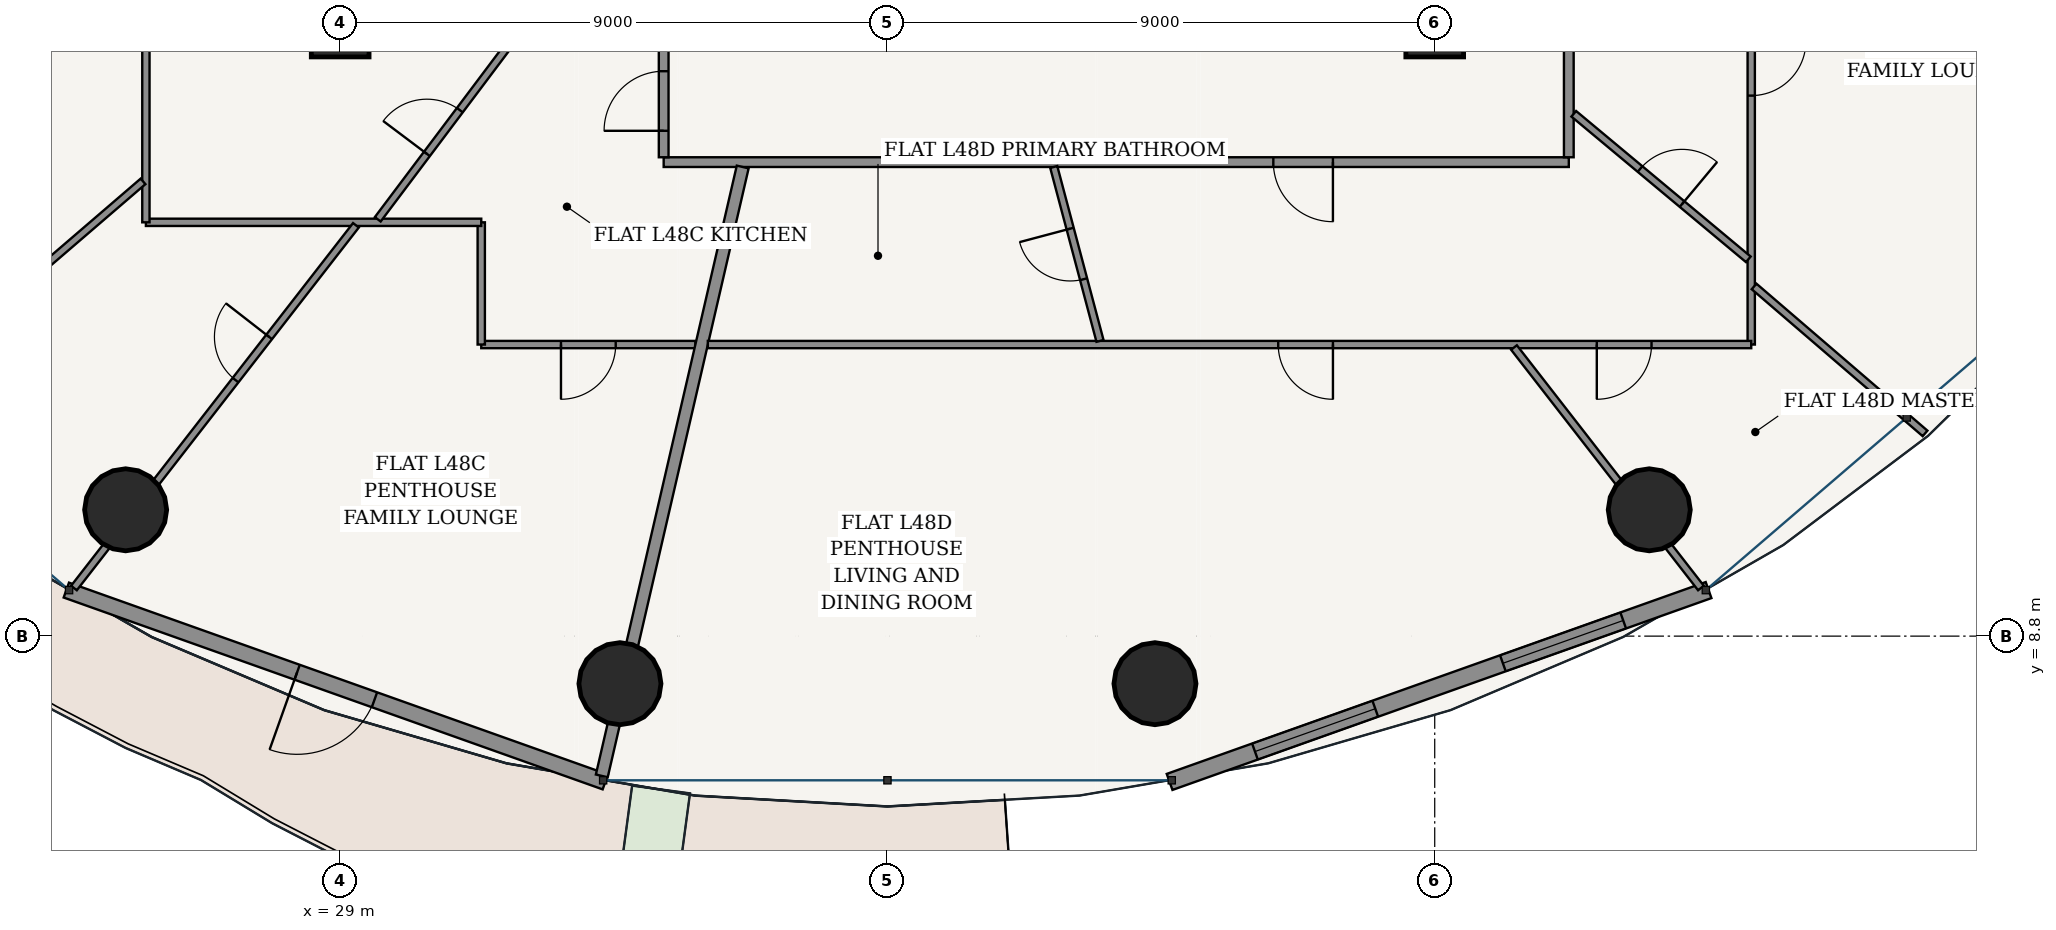
"""IFC4 building model, lengths in metres.
Left out: names, types, materials, properties, quantities, classifications, styles, units other than length and angle.
Written with IfcOpenShell. Run it as: python <this file> out.ifc"""

import sys

from ifc_helpers import new_model, si_unit, direction, frame, frame_2d, origin, origin_2d, place, context, subcontext, project, spatial, rectangle, hollow_circle, extrude, source, transform, mapped, element, fill, save


model = new_model("IFC4")
c1 = context("Model", 3, precision=1e-05, world=origin(), true_north=direction((-0.2419218956, 0.970295726276)))
c2 = subcontext(c1, "Body", "Model", "MODEL_VIEW")
j1 = project(units=[si_unit("LENGTHUNIT", "METRE"), si_unit("PLANEANGLEUNIT", "RADIAN")], contexts=[c1])
p1 = place(None, origin())
s1 = spatial("IfcSite", under=j1, at=p1, CompositionType="ELEMENT")
p2 = place(p1, origin())
s2 = spatial("IfcBuilding", under=s1, at=p2, CompositionType="ELEMENT")
p3 = place(p2, frame((0.0, 0.0, 182.2)))
s3 = spatial("IfcBuildingStorey", under=s2, at=p3, CompositionType="ELEMENT", Elevation=182.2)
for number, where, z_axis, x_axis in (
    (1, (29.0, 18.8, 0.0), (0.0, 0.0, 1.0), (1.0, 0.0, 0.0)),
    (2, (47.0, 18.8, 0.0), (0.0, 0.0, 1.0), (1.0, 0.0, 0.0)),
):
    element("IfcColumn", number, at=place(p3, frame(where, z_axis=z_axis, x_axis=x_axis)), inside=s3, PredefinedType="COLUMN", context=c2, shape_type="SweptSolid", body=[
        extrude(rectangle(XDim=0.95, YDim=0.95, at=origin_2d()), origin(), (0.0, 0.0, 1.0), 3.6),
    ])
for number, where, z_axis, x_axis in (
    (3, (25.472, 10.877, 0.0), (0.0, 0.0, 1.0), (1.0, 0.0, 0.0)),
    (4, (33.601, 8.018, 0.0), (0.0, 0.0, 1.0), (1.0, 0.0, 0.0)),
    (5, (42.399, 8.018, 0.0), (0.0, 0.0, 1.0), (1.0, 0.0, 0.0)),
    (6, (50.528, 10.877, 0.0), (0.0, 0.0, 1.0), (1.0, 0.0, 0.0)),
):
    element("IfcColumn", number, at=place(p3, frame(where, z_axis=z_axis, x_axis=x_axis)), inside=s3, PredefinedType="COLUMN", context=c2, shape_type="SweptSolid", body=[
        extrude(hollow_circle(Radius=0.675, WallThickness=0.042, at=origin_2d()), origin(), (0.0, 0.0, 1.0), 3.6),
    ])
p4 = place(p3, frame((24.497, 9.557, 0.0), z_axis=(0.0, 0.0, 1.0), x_axis=(0.942103604331, -0.335321932934, 0.0)))
e7 = element("IfcWall", 7, at=p4, inside=s3, PredefinedType="SOLIDWALL", context=c2, shape_type="SweptSolid", body=[
    extrude(rectangle(XDim=9.408, YDim=0.26, at=frame_2d((4.704, 0.0))), origin(), (0.0, 0.0, 1.0), 3.15),
])
p5 = place(p4, frame((4.029, 0.0, 0.0)))
e8 = element("IfcOpeningElement", 8, at=p5, cuts=e7, PredefinedType="OPENING", context=c2, shape_type="SweptSolid", body=[
    extrude(rectangle(XDim=1.35, YDim=2.2, at=frame_2d((0.675, 1.1))), frame((0.0, 0.14, 0.0), z_axis=(0.0, -1.0, 0.0), x_axis=(1.0, 0.0, 0.0)), (0.0, 0.0, 1.0), 0.28),
])
p6 = place(p3, frame((42.64, 6.402, 0.0), z_axis=(0.0, 0.0, 1.0), x_axis=(0.942103604331, 0.335321932934, 0.0)))
e9 = element("IfcWall", 9, at=p6, inside=s3, PredefinedType="SOLIDWALL", context=c2, shape_type="SweptSolid", body=[
    extrude(rectangle(XDim=9.408, YDim=0.28, at=frame_2d((4.704, 0.0))), origin(), (0.0, 0.0, 1.0), 3.15),
])
p7 = place(p6, frame((1.49, 0.0, 0.85)))
e10 = element("IfcOpeningElement", 10, at=p7, cuts=e9, PredefinedType="OPENING", context=c2, shape_type="SweptSolid", body=[
    extrude(rectangle(XDim=2.1, YDim=1.95, at=frame_2d((1.05, 0.975))), frame((0.0, 0.15, 0.0), z_axis=(0.0, -1.0, 0.0), x_axis=(1.0, 0.0, 0.0)), (0.0, 0.0, 1.0), 0.3),
])
p8 = place(p6, frame((5.818, 0.0, 0.85)))
e11 = element("IfcOpeningElement", 11, at=p8, cuts=e9, PredefinedType="OPENING", context=c2, shape_type="SweptSolid", body=[
    extrude(rectangle(XDim=2.1, YDim=1.95, at=frame_2d((1.05, 0.975))), frame((0.0, 0.15, 0.0), z_axis=(0.0, -1.0, 0.0), x_axis=(1.0, 0.0, 0.0)), (0.0, 0.0, 1.0), 0.3),
])
p9 = place(p3, frame((34.32, 16.595, 0.0), z_axis=(0.0, 0.0, 1.0), x_axis=(1.0, 0.0, 0.0)))
e12 = element("IfcWall", 12, at=p9, inside=s3, PredefinedType="PARTITIONING", context=c2, shape_type="SweptSolid", body=[
    extrude(rectangle(XDim=14.885, YDim=0.16, at=frame_2d((7.442, 0.0))), origin(), (0.0, 0.0, 1.0), 2.666),
])
p10 = place(p9, frame((10.026, 0.0, 0.0)))
e13 = element("IfcOpeningElement", 13, at=p10, cuts=e12, PredefinedType="OPENING", context=c2, shape_type="SweptSolid", body=[
    extrude(rectangle(XDim=0.98, YDim=2.2, at=frame_2d((0.49, 1.1))), frame((0.0, 0.09, 0.0), z_axis=(0.0, -1.0, 0.0), x_axis=(1.0, 0.0, 0.0)), (0.0, 0.0, 1.0), 0.18),
])
p11 = place(p3, frame((34.32, 16.675, 0.0), z_axis=(0.0, 0.0, 1.0), x_axis=(0.0, 1.0, 0.0)))
e14 = element("IfcWall", 14, at=p11, inside=s3, PredefinedType="PARTITIONING", context=c2, shape_type="SweptSolid", body=[
    extrude(rectangle(XDim=1.85, YDim=0.16, at=frame_2d((0.925, 0.0))), origin(), (0.0, 0.0, 1.0), 3.15),
])
p12 = place(p11, frame((0.435, 0.0, 0.0)))
e15 = element("IfcOpeningElement", 15, at=p12, cuts=e14, PredefinedType="OPENING", context=c2, shape_type="SweptSolid", body=[
    extrude(rectangle(XDim=0.98, YDim=2.2, at=frame_2d((0.49, 1.1))), frame((0.0, 0.09, 0.0), z_axis=(0.0, -1.0, 0.0), x_axis=(1.0, 0.0, 0.0)), (0.0, 0.0, 1.0), 0.18),
])
p13 = place(p3, frame((49.205, 16.675, 0.0), z_axis=(0.0, 0.0, 1.0), x_axis=(0.0, 1.0, 0.0)))
e16 = element("IfcWall", 16, at=p13, inside=s3, PredefinedType="PARTITIONING", context=c2, shape_type="SweptSolid", body=[
    extrude(rectangle(XDim=18.4, YDim=0.16, at=frame_2d((9.2, 0.0))), origin(), (0.0, 0.0, 1.0), 2.666),
])
p14 = place(p3, frame((34.842, 13.595, 0.0), z_axis=(0.0, 0.0, 1.0), x_axis=(-1.0, 0.0, 0.0)))
e17 = element("IfcWall", 17, at=p14, inside=s3, PredefinedType="PARTITIONING", context=c2, shape_type="SweptSolid", body=[
    extrude(rectangle(XDim=3.522, YDim=0.12, at=frame_2d((1.761, 0.0))), origin(), (0.0, 0.0, 1.0), 3.15),
])
p15 = place(p14, frame((1.311, 0.0, 0.0)))
e18 = element("IfcOpeningElement", 18, at=p15, cuts=e17, PredefinedType="OPENING", context=c2, shape_type="SweptSolid", body=[
    extrude(rectangle(XDim=0.9, YDim=2.15, at=frame_2d((0.45, 1.075))), frame((0.0, 0.07, 0.0), z_axis=(0.0, -1.0, 0.0), x_axis=(1.0, 0.0, 0.0)), (0.0, 0.0, 1.0), 0.14),
])
p16 = place(p3, frame((31.32, 13.595, 0.0), z_axis=(0.0, 0.0, 1.0), x_axis=(0.0, 1.0, 0.0)))
e19 = element("IfcWall", 19, at=p16, inside=s3, PredefinedType="PARTITIONING", context=c2, shape_type="SweptSolid", body=[
    extrude(rectangle(XDim=2.01, YDim=0.12, at=frame_2d((1.005, 0.0))), origin(), (0.0, 0.0, 1.0), 2.825),
])
p17 = place(p3, frame((31.32, 15.605, 0.0), z_axis=(0.0, 0.0, 1.0), x_axis=(-1.0, 0.0, 0.0)))
e20 = element("IfcWall", 20, at=p17, inside=s3, PredefinedType="PARTITIONING", context=c2, shape_type="SweptSolid", body=[
    extrude(rectangle(XDim=5.515, YDim=0.12, at=frame_2d((2.758, 0.0))), origin(), (0.0, 0.0, 1.0), 2.666),
])
p18 = place(p3, frame((25.805, 15.605, 0.0), z_axis=(0.0, 0.0, 1.0), x_axis=(0.0, 1.0, 0.0)))
e21 = element("IfcWall", 21, at=p18, inside=s3, PredefinedType="PARTITIONING", context=c2, shape_type="SweptSolid", body=[
    extrude(rectangle(XDim=5.715, YDim=0.12, at=frame_2d((2.857, 0.0))), origin(), (0.0, 0.0, 1.0), 2.666),
])
p19 = place(p3, frame((25.758, 16.278, 0.0), z_axis=(0.0, 0.0, 1.0), x_axis=(-0.758374994665, -0.651818508073, 0.0)))
e22 = element("IfcWall", 22, at=p19, inside=s3, PredefinedType="PARTITIONING", context=c2, shape_type="SweptSolid", body=[
    extrude(rectangle(XDim=6.358, YDim=0.12, at=frame_2d((3.179, 0.0))), origin(), (0.0, 0.0, 1.0), 2.666),
])
p20 = place(p19, frame((2.729, 0.0, 0.0)))
e23 = element("IfcOpeningElement", 23, at=p20, cuts=e22, PredefinedType="OPENING", context=c2, shape_type="SweptSolid", body=[
    extrude(rectangle(XDim=0.9, YDim=2.15, at=frame_2d((0.45, 1.075))), frame((0.0, 0.07, 0.0), z_axis=(0.0, -1.0, 0.0), x_axis=(1.0, 0.0, 0.0)), (0.0, 0.0, 1.0), 0.14),
])
p21 = place(p3, frame((29.259, 15.556, 0.0), z_axis=(0.0, 0.0, 1.0), x_axis=(-0.61375493029, -0.789496602617, 0.0)))
e24 = element("IfcWall", 24, at=p21, inside=s3, PredefinedType="PARTITIONING", context=c2, shape_type="SweptSolid", body=[
    extrude(rectangle(XDim=7.556, YDim=0.12, at=frame_2d((3.778, 0.0))), origin(), (0.0, 0.0, 1.0), 2.5),
])
p22 = place(p21, frame((2.325, 0.0, 0.0)))
e25 = element("IfcOpeningElement", 25, at=p22, cuts=e24, PredefinedType="OPENING", context=c2, shape_type="SweptSolid", body=[
    extrude(rectangle(XDim=0.9, YDim=2.15, at=frame_2d((0.45, 1.075))), frame((0.0, 0.07, 0.0), z_axis=(0.0, -1.0, 0.0), x_axis=(1.0, 0.0, 0.0)), (0.0, 0.0, 1.0), 0.14),
])
p23 = place(p3, frame((31.777, 18.525, 0.0), z_axis=(0.0, 0.0, 1.0), x_axis=(-0.601054484551, -0.799208049635, 0.0)))
e26 = element("IfcWall", 26, at=p23, inside=s3, PredefinedType="PARTITIONING", context=c2, shape_type="SweptSolid", body=[
    extrude(rectangle(XDim=3.592, YDim=0.12, at=frame_2d((1.796, 0.0))), origin(), (0.0, 0.0, 1.0), 3.15),
])
p24 = place(p23, frame((1.346, 0.0, 0.0)))
e27 = element("IfcOpeningElement", 27, at=p24, cuts=e26, PredefinedType="OPENING", context=c2, shape_type="SweptSolid", body=[
    extrude(rectangle(XDim=0.9, YDim=2.15, at=frame_2d((0.45, 1.075))), frame((0.0, 0.07, 0.0), z_axis=(0.0, -1.0, 0.0), x_axis=(1.0, 0.0, 0.0)), (0.0, 0.0, 1.0), 0.14),
])
p25 = place(p3, frame((35.62, 16.515, 0.0), z_axis=(0.0, 0.0, 1.0), x_axis=(-0.225473598067, -0.974249278457, 0.0)))
e28 = element("IfcWall", 28, at=p25, inside=s3, PredefinedType="PARTITIONING", context=c2, shape_type="SweptSolid", body=[
    extrude(rectangle(XDim=10.278, YDim=0.2, at=frame_2d((5.139, 0.0))), origin(), (0.0, 0.0, 1.0), 2.5),
])
p26 = place(p3, frame((52.205, 21.641, 0.0), z_axis=(0.0, 0.0, 1.0), x_axis=(0.0, -1.0, 0.0)))
e29 = element("IfcWall", 29, at=p26, inside=s3, PredefinedType="PARTITIONING", context=c2, shape_type="SweptSolid", body=[
    extrude(rectangle(XDim=8.046, YDim=0.12, at=frame_2d((4.023, 0.0))), origin(), (0.0, 0.0, 1.0), 2.666),
])
p27 = place(p26, frame((3.052, 0.0, 0.0)))
e30 = element("IfcOpeningElement", 30, at=p27, cuts=e29, PredefinedType="OPENING", context=c2, shape_type="SweptSolid", body=[
    extrude(rectangle(XDim=0.9, YDim=2.15, at=frame_2d((0.45, 1.075))), frame((0.0, 0.07, 0.0), z_axis=(0.0, -1.0, 0.0), x_axis=(1.0, 0.0, 0.0)), (0.0, 0.0, 1.0), 0.14),
])
p28 = place(p3, frame((52.205, 13.595, 0.0), z_axis=(0.0, 0.0, 1.0), x_axis=(-1.0, 0.0, 0.0)))
e31 = element("IfcWall", 31, at=p28, inside=s3, PredefinedType="PARTITIONING", context=c2, shape_type="SweptSolid", body=[
    extrude(rectangle(XDim=17.159, YDim=0.12, at=frame_2d((8.58, 0.0))), origin(), (0.0, 0.0, 1.0), 2.666),
])
p29 = place(p28, frame((6.879, 0.0, 0.0)))
e32 = element("IfcOpeningElement", 32, at=p29, cuts=e31, PredefinedType="OPENING", context=c2, shape_type="SweptSolid", body=[
    extrude(rectangle(XDim=0.9, YDim=2.15, at=frame_2d((0.45, 1.075))), frame((0.0, 0.07, 0.0), z_axis=(0.0, -1.0, 0.0), x_axis=(1.0, 0.0, 0.0)), (0.0, 0.0, 1.0), 0.14),
])
p30 = place(p28, frame((1.64, 0.0, 0.0)))
e33 = element("IfcOpeningElement", 33, at=p30, cuts=e31, PredefinedType="OPENING", context=c2, shape_type="SweptSolid", body=[
    extrude(rectangle(XDim=0.9, YDim=2.15, at=frame_2d((0.45, 1.075))), frame((0.0, 0.07, 0.0), z_axis=(0.0, -1.0, 0.0), x_axis=(1.0, 0.0, 0.0)), (0.0, 0.0, 1.0), 0.14),
])
p31 = place(p3, frame((48.304, 13.546, 0.0), z_axis=(0.0, 0.0, 1.0), x_axis=(0.613734792328, -0.789512257464, 0.0)))
e34 = element("IfcWall", 34, at=p31, inside=s3, PredefinedType="PARTITIONING", context=c2, shape_type="SweptSolid", body=[
    extrude(rectangle(XDim=5.01, YDim=0.12, at=frame_2d((2.505, 0.0))), origin(), (0.0, 0.0, 1.0), 2.5),
])
p32 = place(p3, frame((52.252, 14.55, 0.0), z_axis=(0.0, 0.0, 1.0), x_axis=(0.758368113794, -0.651826513714, 0.0)))
e35 = element("IfcWall", 35, at=p32, inside=s3, PredefinedType="PARTITIONING", context=c2, shape_type="SweptSolid", body=[
    extrude(rectangle(XDim=3.708, YDim=0.12, at=frame_2d((1.854, 0.0))), origin(), (0.0, 0.0, 1.0), 2.666),
])
p33 = place(p3, frame((40.735, 16.515, 0.0), z_axis=(0.0, 0.0, 1.0), x_axis=(0.256989915822, -0.966414084731, 0.0)))
e36 = element("IfcWall", 36, at=p33, inside=s3, PredefinedType="PARTITIONING", context=c2, shape_type="SweptSolid", body=[
    extrude(rectangle(XDim=2.959, YDim=0.12, at=frame_2d((1.479, 0.0))), origin(), (0.0, 0.0, 1.0), 2.825),
])
p34 = place(p33, frame((1.05, 0.0, 0.0)))
e37 = element("IfcOpeningElement", 37, at=p34, cuts=e36, PredefinedType="OPENING", context=c2, shape_type="SweptSolid", body=[
    extrude(rectangle(XDim=0.86, YDim=2.15, at=frame_2d((0.43, 1.075))), frame((0.0, 0.07, 0.0), z_axis=(0.0, -1.0, 0.0), x_axis=(1.0, 0.0, 0.0)), (0.0, 0.0, 1.0), 0.14),
])
p35 = place(p3, frame((49.287, 17.39, 0.0), z_axis=(0.0, 0.0, 1.0), x_axis=(0.768065994597, -0.640370695725, 0.0)))
e38 = element("IfcWall", 38, at=p35, inside=s3, PredefinedType="PARTITIONING", context=c2, shape_type="SweptSolid", body=[
    extrude(rectangle(XDim=3.738, YDim=0.12, at=frame_2d((1.869, 0.0))), origin(), (0.0, 0.0, 1.0), 2.825),
])
p36 = place(p35, frame((1.419, 0.0, 0.0)))
e39 = element("IfcOpeningElement", 39, at=p36, cuts=e38, PredefinedType="OPENING", context=c2, shape_type="SweptSolid", body=[
    extrude(rectangle(XDim=0.9, YDim=2.15, at=frame_2d((0.45, 1.075))), frame((0.0, 0.07, 0.0), z_axis=(0.0, -1.0, 0.0), x_axis=(1.0, 0.0, 0.0)), (0.0, 0.0, 1.0), 0.14),
])
m1 = source(origin(), c2, "Body", "SweptSolid", [
    extrude(rectangle(XDim=1.35, YDim=2.2, at=frame_2d((0.675, 1.1))), frame((0.0, 0.025, 0.0), z_axis=(0.0, -1.0, 0.0), x_axis=(1.0, 0.0, 0.0)), (0.0, 0.0, 1.0), 0.05),
])
p37 = place(p5, frame((1.35, 0.0, 0.0), z_axis=(0.0, 0.0, 1.0), x_axis=(-1.0, 0.0, 0.0)))
e40 = element("IfcDoor", 40, at=p37, inside=s3, OperationType="SINGLE_SWING_RIGHT", PredefinedType="DOOR", context=c2, shape_type="MappedRepresentation", body=[
    mapped(m1, transform((0.0, 0.0, 0.0), scale=1.0)),
])
fill(e8, e40)
m2 = source(origin(), c2, "Body", "SweptSolid", [
    extrude(rectangle(XDim=2.1, YDim=1.95, at=frame_2d((1.05, 0.975))), frame((0.0, 0.03, 0.0), z_axis=(0.0, -1.0, 0.0), x_axis=(1.0, 0.0, 0.0)), (0.0, 0.0, 1.0), 0.06),
])
p38 = place(p7, origin())
e41 = element("IfcWindow", 41, at=p38, inside=s3, PartitioningType="SINGLE_PANEL", PredefinedType="WINDOW", context=c2, shape_type="MappedRepresentation", body=[
    mapped(m2, transform((0.0, 0.0, 0.0), scale=1.0)),
])
fill(e10, e41)
p39 = place(p8, origin())
e42 = element("IfcWindow", 42, at=p39, inside=s3, PartitioningType="SINGLE_PANEL", PredefinedType="WINDOW", context=c2, shape_type="MappedRepresentation", body=[
    mapped(m2, transform((0.0, 0.0, 0.0), scale=1.0)),
])
fill(e11, e42)
m3 = source(origin(), c2, "Body", "SweptSolid", [
    extrude(rectangle(XDim=0.98, YDim=2.2, at=frame_2d((0.49, 1.1))), frame((0.0, 0.025, 0.0), z_axis=(0.0, -1.0, 0.0), x_axis=(1.0, 0.0, 0.0)), (0.0, 0.0, 1.0), 0.05),
])
p40 = place(p12, origin())
e43 = element("IfcDoor", 43, at=p40, inside=s3, OperationType="SINGLE_SWING_LEFT", PredefinedType="DOOR", context=c2, shape_type="MappedRepresentation", body=[
    mapped(m3, transform((0.0, 0.0, 0.0), scale=1.0)),
])
fill(e15, e43)
m4 = source(origin(), c2, "Body", "SweptSolid", [
    extrude(rectangle(XDim=0.9, YDim=2.15, at=frame_2d((0.45, 1.075))), frame((0.0, 0.025, 0.0), z_axis=(0.0, -1.0, 0.0), x_axis=(1.0, 0.0, 0.0)), (0.0, 0.0, 1.0), 0.05),
])
p41 = place(p15, origin())
e44 = element("IfcDoor", 44, at=p41, inside=s3, OperationType="SINGLE_SWING_RIGHT", PredefinedType="DOOR", context=c2, shape_type="MappedRepresentation", body=[
    mapped(m4, transform((0.0, 0.0, 0.0), scale=1.0)),
])
fill(e18, e44)
p42 = place(p24, frame((0.9, 0.0, 0.0), z_axis=(0.0, 0.0, 1.0), x_axis=(-1.0, 0.0, 0.0)))
e45 = element("IfcDoor", 45, at=p42, inside=s3, OperationType="SINGLE_SWING_LEFT", PredefinedType="DOOR", context=c2, shape_type="MappedRepresentation", body=[
    mapped(m4, transform((0.0, 0.0, 0.0), scale=1.0)),
])
fill(e27, e45)
p43 = place(p22, frame((0.9, 0.0, 0.0), z_axis=(0.0, 0.0, 1.0), x_axis=(-1.0, 0.0, 0.0)))
e46 = element("IfcDoor", 46, at=p43, inside=s3, OperationType="SINGLE_SWING_RIGHT", PredefinedType="DOOR", context=c2, shape_type="MappedRepresentation", body=[
    mapped(m4, transform((0.0, 0.0, 0.0), scale=1.0)),
])
fill(e25, e46)
p44 = place(p10, frame((0.98, 0.0, 0.0), z_axis=(0.0, 0.0, 1.0), x_axis=(-1.0, 0.0, 0.0)))
e47 = element("IfcDoor", 47, at=p44, inside=s3, OperationType="SINGLE_SWING_LEFT", PredefinedType="DOOR", context=c2, shape_type="MappedRepresentation", body=[
    mapped(m3, transform((0.0, 0.0, 0.0), scale=1.0)),
])
fill(e13, e47)
m5 = source(origin(), c2, "Body", "SweptSolid", [
    extrude(rectangle(XDim=0.86, YDim=2.15, at=frame_2d((0.43, 1.075))), frame((0.0, 0.025, 0.0), z_axis=(0.0, -1.0, 0.0), x_axis=(1.0, 0.0, 0.0)), (0.0, 0.0, 1.0), 0.05),
])
p45 = place(p34, frame((0.86, 0.0, 0.0), z_axis=(0.0, 0.0, 1.0), x_axis=(-1.0, 0.0, 0.0)))
e48 = element("IfcDoor", 48, at=p45, inside=s3, OperationType="SINGLE_SWING_RIGHT", PredefinedType="DOOR", context=c2, shape_type="MappedRepresentation", body=[
    mapped(m5, transform((0.0, 0.0, 0.0), scale=1.0)),
])
fill(e37, e48)
p46 = place(p29, origin())
e49 = element("IfcDoor", 49, at=p46, inside=s3, OperationType="SINGLE_SWING_LEFT", PredefinedType="DOOR", context=c2, shape_type="MappedRepresentation", body=[
    mapped(m4, transform((0.0, 0.0, 0.0), scale=1.0)),
])
fill(e32, e49)
p47 = place(p36, origin())
e50 = element("IfcDoor", 50, at=p47, inside=s3, OperationType="SINGLE_SWING_RIGHT", PredefinedType="DOOR", context=c2, shape_type="MappedRepresentation", body=[
    mapped(m4, transform((0.0, 0.0, 0.0), scale=1.0)),
])
fill(e39, e50)
p48 = place(p27, origin())
e51 = element("IfcDoor", 51, at=p48, inside=s3, OperationType="SINGLE_SWING_LEFT", PredefinedType="DOOR", context=c2, shape_type="MappedRepresentation", body=[
    mapped(m4, transform((0.0, 0.0, 0.0), scale=1.0)),
])
fill(e30, e51)
p49 = place(p30, origin())
e52 = element("IfcDoor", 52, at=p49, inside=s3, OperationType="SINGLE_SWING_RIGHT", PredefinedType="DOOR", context=c2, shape_type="MappedRepresentation", body=[
    mapped(m4, transform((0.0, 0.0, 0.0), scale=1.0)),
])
fill(e33, e52)
save(model, sys.argv[1])
